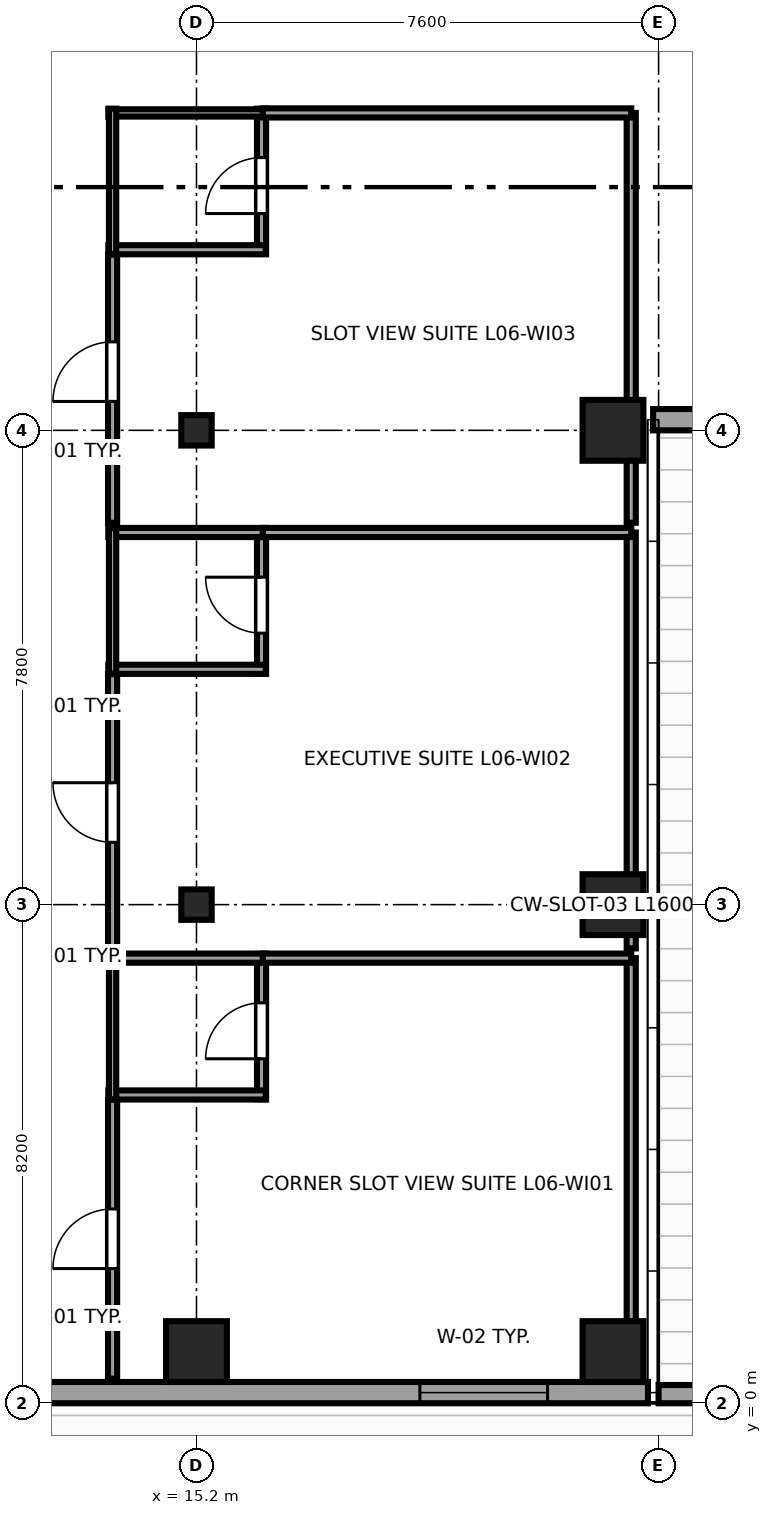
"""IFC4 building model, lengths in metres.
Left out: names, types, materials, properties, quantities, classifications, styles, units other than length and angle.
Written with IfcOpenShell. Run it as: python <this file> out.ifc"""

import sys

from ifc_helpers import new_model, si_unit, direction, frame, frame_2d, origin, origin_2d, place, context, subcontext, project, spatial, rectangle, i_section, extrude, source, transform, mapped, element, fill, save


model = new_model("IFC4")
c1 = context("Model", 3, precision=1e-05, world=origin(), true_north=direction((0.0, 1.0)))
c2 = subcontext(c1, "Body", "Model", "MODEL_VIEW")
j1 = project(units=[si_unit("LENGTHUNIT", "METRE"), si_unit("PLANEANGLEUNIT", "RADIAN")], contexts=[c1])
p1 = place(None, origin())
s1 = spatial("IfcSite", under=j1, at=p1, CompositionType="ELEMENT")
p2 = place(p1, origin())
s2 = spatial("IfcBuilding", under=s1, at=p2, CompositionType="ELEMENT")
p3 = place(p2, frame((0.0, 0.0, 32.0)))
s3 = spatial("IfcBuildingStorey", under=s2, at=p3, CompositionType="ELEMENT", Elevation=32.0)
m1 = source(origin(), c2, "Body", "SweptSolid", [
    extrude(rectangle(XDim=1.0, YDim=1.0, at=origin_2d()), origin(), (0.0, 0.0, 1.0), 3.55),
])
p4 = place(p3, frame((15.2, 0.85, 0.0), z_axis=(0.0, 0.0, 1.0), x_axis=(1.0, 0.0, 0.0)))
e1 = element("IfcColumn", 1, at=p4, inside=s3, PredefinedType="COLUMN", context=c2, shape_type="MappedRepresentation", body=[
    mapped(m1, transform((0.0, 0.0, 0.0), x_axis=(1.0, 0.0, 0.0), y_axis=(0.0, 1.0, 0.0), z_axis=(0.0, 0.0, 1.0), scale=1.0)),
])
m2 = source(origin(), c2, "Body", "SweptSolid", [
    extrude(i_section(OverallWidth=0.5, OverallDepth=0.5, WebThickness=0.028, FlangeThickness=0.045, at=origin_2d()), origin(), (0.0, 0.0, 1.0), 3.55),
])
for number, where, z_axis, x_axis in (
    (2, (15.2, 8.2, 0.0), (0.0, 0.0, 1.0), (1.0, 0.0, 0.0)),
    (3, (15.2, 16.0, 0.0), (0.0, 0.0, 1.0), (1.0, 0.0, 0.0)),
):
    element("IfcColumn", number, at=place(p3, frame(where, z_axis=z_axis, x_axis=x_axis)), inside=s3, PredefinedType="COLUMN", context=c2, shape_type="MappedRepresentation", body=[
        mapped(m2, transform((0.0, 0.0, 0.0), x_axis=(1.0, 0.0, 0.0), y_axis=(0.0, 1.0, 0.0), z_axis=(0.0, 0.0, 1.0), scale=1.0)),
    ])
for number, where, z_axis, x_axis in (
    (4, (22.05, 0.85, 0.0), (0.0, 0.0, 1.0), (1.0, 0.0, 0.0)),
    (5, (22.05, 8.2, 0.0), (0.0, 0.0, 1.0), (1.0, 0.0, 0.0)),
    (6, (22.05, 16.0, 0.0), (0.0, 0.0, 1.0), (1.0, 0.0, 0.0)),
):
    element("IfcColumn", number, at=place(p3, frame(where, z_axis=z_axis, x_axis=x_axis)), inside=s3, PredefinedType="COLUMN", context=c2, shape_type="MappedRepresentation", body=[
        mapped(m1, transform((0.0, 0.0, 0.0), x_axis=(1.0, 0.0, 0.0), y_axis=(0.0, 1.0, 0.0), z_axis=(0.0, 0.0, 1.0), scale=1.0)),
    ])
p5 = place(p3, frame((4.617, 0.175, 0.0), z_axis=(0.0, 0.0, 1.0), x_axis=(1.0, 0.0, 0.0)))
e7 = element("IfcWall", 7, at=p5, inside=s3, PredefinedType="SOLIDWALL", context=c2, shape_type="SweptSolid", body=[
    extrude(rectangle(XDim=18.008, YDim=0.35, at=frame_2d((9.004, 0.0))), origin(), (0.0, 0.0, 1.0), 3.37),
])
p6 = place(p5, frame((14.257, 0.0, 0.68)))
e8 = element("IfcOpeningElement", 8, at=p6, cuts=e7, PredefinedType="OPENING", context=c2, shape_type="SweptSolid", body=[
    extrude(rectangle(XDim=2.1, YDim=1.9, at=frame_2d((1.05, 0.95))), frame((0.0, 0.185, 0.0), z_axis=(0.0, -1.0, 0.0), x_axis=(1.0, 0.0, 0.0)), (0.0, 0.0, 1.0), 0.37),
])
p7 = place(p5, frame((3.7, 0.0, 0.62)))
e9 = element("IfcOpeningElement", 9, at=p7, cuts=e7, PredefinedType="OPENING", context=c2, shape_type="SweptSolid", body=[
    extrude(rectangle(XDim=1.5, YDim=1.55, at=frame_2d((0.75, 0.775))), frame((0.0, 0.185, 0.0), z_axis=(0.0, -1.0, 0.0), x_axis=(1.0, 0.0, 0.0)), (0.0, 0.0, 1.0), 0.37),
])
p8 = place(p3, frame((22.71, 16.175, 0.0), z_axis=(0.0, 0.0, 1.0), x_axis=(1.0, 0.0, 0.0)))
e10 = element("IfcWall", 10, at=p8, inside=s3, PredefinedType="SOLIDWALL", context=c2, shape_type="SweptSolid", body=[
    extrude(rectangle(XDim=11.58, YDim=0.35, at=frame_2d((5.79, 0.0))), origin(), (0.0, 0.0, 1.0), 2.748),
])
p9 = place(p8, frame((2.145, 0.0, 0.68)))
e11 = element("IfcOpeningElement", 11, at=p9, cuts=e10, PredefinedType="OPENING", context=c2, shape_type="SweptSolid", body=[
    extrude(rectangle(XDim=2.1, YDim=1.9, at=frame_2d((1.05, 0.95))), frame((0.0, 0.185, 0.0), z_axis=(0.0, -1.0, 0.0), x_axis=(1.0, 0.0, 0.0)), (0.0, 0.0, 1.0), 0.37),
])
p10 = place(p8, frame((7.335, 0.0, 0.68)))
e12 = element("IfcOpeningElement", 12, at=p10, cuts=e10, PredefinedType="OPENING", context=c2, shape_type="SweptSolid", body=[
    extrude(rectangle(XDim=2.1, YDim=1.9, at=frame_2d((1.05, 0.95))), frame((0.0, 0.185, 0.0), z_axis=(0.0, -1.0, 0.0), x_axis=(1.0, 0.0, 0.0)), (0.0, 0.0, 1.0), 0.37),
])
p11 = place(p3, frame((22.8, 0.15, 0.0), z_axis=(0.0, 0.0, 1.0), x_axis=(1.0, 0.0, 0.0)))
e13 = element("IfcWall", 13, at=p11, inside=s3, PredefinedType="PARAPET", context=c2, shape_type="SweptSolid", body=[
    extrude(rectangle(XDim=11.4, YDim=0.3, at=frame_2d((5.7, 0.0))), origin(), (0.0, 0.0, 1.0), 1.15),
])
p12 = place(p3, frame((16.27, 5.0, 0.0), z_axis=(0.0, 0.0, 1.0), x_axis=(0.0, 1.0, 0.0)))
e14 = element("IfcWall", 14, at=p12, inside=s3, PredefinedType="PARTITIONING", context=c2, shape_type="SweptSolid", body=[
    extrude(rectangle(XDim=2.39, YDim=0.15, at=frame_2d((1.195, 0.0))), origin(), (0.0, 0.0, 1.0), 3.37),
])
p13 = place(p12, frame((0.665, 0.0, 0.0)))
e15 = element("IfcOpeningElement", 15, at=p13, cuts=e14, PredefinedType="OPENING", context=c2, shape_type="SweptSolid", body=[
    extrude(rectangle(XDim=0.92, YDim=2.01, at=frame_2d((0.46, 1.005))), frame((0.0, 0.085, 0.0), z_axis=(0.0, -1.0, 0.0), x_axis=(1.0, 0.0, 0.0)), (0.0, 0.0, 1.0), 0.17),
])
for number, where, z_axis, x_axis in (
    (16, (13.75, 5.07, 0.0), (0.0, 0.0, 1.0), (1.0, 0.0, 0.0)),
    (17, (13.75, 7.32, 0.0), (0.0, 0.0, 1.0), (1.0, 0.0, 0.0)),
):
    element("IfcWall", number, at=place(p3, frame(where, z_axis=z_axis, x_axis=x_axis)), inside=s3, PredefinedType="PARTITIONING", context=c2, shape_type="SweptSolid", body=[
        extrude(rectangle(XDim=2.59, YDim=0.15, at=frame_2d((1.295, 0.0))), origin(), (0.0, 0.0, 1.0), 3.37),
    ])
p14 = place(p3, frame((13.82, 5.0, 0.0), z_axis=(0.0, 0.0, 1.0), x_axis=(0.0, 1.0, 0.0)))
e18 = element("IfcWall", 18, at=p14, inside=s3, PredefinedType="PLUMBINGWALL", context=c2, shape_type="SweptSolid", body=[
    extrude(rectangle(XDim=2.39, YDim=0.12, at=frame_2d((1.195, 0.0))), origin(), (0.0, 0.0, 1.0), 3.37),
])
p15 = place(p3, frame((16.27, 12.0, 0.0), z_axis=(0.0, 0.0, 1.0), x_axis=(0.0, 1.0, 0.0)))
e19 = element("IfcWall", 19, at=p15, inside=s3, PredefinedType="PARTITIONING", context=c2, shape_type="SweptSolid", body=[
    extrude(rectangle(XDim=2.39, YDim=0.15, at=frame_2d((1.195, 0.0))), origin(), (0.0, 0.0, 1.0), 3.37),
])
p16 = place(p15, frame((0.665, 0.0, 0.0)))
e20 = element("IfcOpeningElement", 20, at=p16, cuts=e19, PredefinedType="OPENING", context=c2, shape_type="SweptSolid", body=[
    extrude(rectangle(XDim=0.92, YDim=2.01, at=frame_2d((0.46, 1.005))), frame((0.0, 0.085, 0.0), z_axis=(0.0, -1.0, 0.0), x_axis=(1.0, 0.0, 0.0)), (0.0, 0.0, 1.0), 0.17),
])
for number, where, z_axis, x_axis in (
    (21, (13.75, 12.07, 0.0), (0.0, 0.0, 1.0), (1.0, 0.0, 0.0)),
    (22, (13.75, 14.32, 0.0), (0.0, 0.0, 1.0), (1.0, 0.0, 0.0)),
):
    element("IfcWall", number, at=place(p3, frame(where, z_axis=z_axis, x_axis=x_axis)), inside=s3, PredefinedType="PARTITIONING", context=c2, shape_type="SweptSolid", body=[
        extrude(rectangle(XDim=2.59, YDim=0.15, at=frame_2d((1.295, 0.0))), origin(), (0.0, 0.0, 1.0), 3.37),
    ])
p17 = place(p3, frame((13.82, 12.0, 0.0), z_axis=(0.0, 0.0, 1.0), x_axis=(0.0, 1.0, 0.0)))
e23 = element("IfcWall", 23, at=p17, inside=s3, PredefinedType="PLUMBINGWALL", context=c2, shape_type="SweptSolid", body=[
    extrude(rectangle(XDim=2.39, YDim=0.12, at=frame_2d((1.195, 0.0))), origin(), (0.0, 0.0, 1.0), 3.37),
])
p18 = place(p3, frame((16.27, 18.9, 0.0), z_axis=(0.0, 0.0, 1.0), x_axis=(0.0, 1.0, 0.0)))
e24 = element("IfcWall", 24, at=p18, inside=s3, PredefinedType="PARTITIONING", context=c2, shape_type="SweptSolid", body=[
    extrude(rectangle(XDim=2.39, YDim=0.15, at=frame_2d((1.195, 0.0))), origin(), (0.0, 0.0, 1.0), 3.37),
])
p19 = place(p18, frame((0.665, 0.0, 0.0)))
e25 = element("IfcOpeningElement", 25, at=p19, cuts=e24, PredefinedType="OPENING", context=c2, shape_type="SweptSolid", body=[
    extrude(rectangle(XDim=0.92, YDim=2.01, at=frame_2d((0.46, 1.005))), frame((0.0, 0.085, 0.0), z_axis=(0.0, -1.0, 0.0), x_axis=(1.0, 0.0, 0.0)), (0.0, 0.0, 1.0), 0.17),
])
p20 = place(p3, frame((13.75, 18.97, 0.0), z_axis=(0.0, 0.0, 1.0), x_axis=(1.0, 0.0, 0.0)))
e26 = element("IfcWall", 26, at=p20, inside=s3, PredefinedType="PARTITIONING", context=c2, shape_type="SweptSolid", body=[
    extrude(rectangle(XDim=2.59, YDim=0.15, at=frame_2d((1.295, 0.0))), origin(), (0.0, 0.0, 1.0), 3.37),
])
p21 = place(p3, frame((13.75, 21.22, 0.0), z_axis=(0.0, 0.0, 1.0), x_axis=(1.0, 0.0, 0.0)))
e27 = element("IfcWall", 27, at=p21, inside=s3, PredefinedType="PLUMBINGWALL", context=c2, shape_type="SweptSolid", body=[
    extrude(rectangle(XDim=2.59, YDim=0.12, at=frame_2d((1.295, 0.0))), origin(), (0.0, 0.0, 1.0), 3.37),
])
p22 = place(p3, frame((13.82, 18.9, 0.0), z_axis=(0.0, 0.0, 1.0), x_axis=(0.0, 1.0, 0.0)))
e28 = element("IfcWall", 28, at=p22, inside=s3, PredefinedType="PLUMBINGWALL", context=c2, shape_type="SweptSolid", body=[
    extrude(rectangle(XDim=2.39, YDim=0.12, at=frame_2d((1.195, 0.0))), origin(), (0.0, 0.0, 1.0), 3.37),
])
p23 = place(p3, frame((13.82, 0.405, 0.0), z_axis=(0.0, 0.0, 1.0), x_axis=(0.0, 1.0, 0.0)))
e29 = element("IfcWall", 29, at=p23, inside=s3, PredefinedType="PARTITIONING", context=c2, shape_type="SweptSolid", body=[
    extrude(rectangle(XDim=4.585, YDim=0.15, at=frame_2d((2.292, 0.0))), origin(), (0.0, 0.0, 1.0), 3.37),
])
p24 = place(p23, frame((1.81, 0.0, 0.0)))
e30 = element("IfcOpeningElement", 30, at=p24, cuts=e29, PredefinedType="OPENING", context=c2, shape_type="SweptSolid", body=[
    extrude(rectangle(XDim=0.98, YDim=2.12, at=frame_2d((0.49, 1.06))), frame((0.0, 0.085, 0.0), z_axis=(0.0, -1.0, 0.0), x_axis=(1.0, 0.0, 0.0)), (0.0, 0.0, 1.0), 0.17),
])
p25 = place(p3, frame((22.35, 0.405, 0.0), z_axis=(0.0, 0.0, 1.0), x_axis=(0.0, 1.0, 0.0)))
e31 = element("IfcWall", 31, at=p25, inside=s3, PredefinedType="PARTITIONING", context=c2, shape_type="SweptSolid", body=[
    extrude(rectangle(XDim=6.915, YDim=0.15, at=frame_2d((3.458, 0.0))), origin(), (0.0, 0.0, 1.0), 3.37),
])
p26 = place(p3, frame((16.29, 7.32, 0.0), z_axis=(0.0, 0.0, 1.0), x_axis=(1.0, 0.0, 0.0)))
e32 = element("IfcWall", 32, at=p26, inside=s3, PredefinedType="PARTITIONING", context=c2, shape_type="SweptSolid", body=[
    extrude(rectangle(XDim=6.06, YDim=0.15, at=frame_2d((3.03, 0.0))), origin(), (0.0, 0.0, 1.0), 3.37),
])
p27 = place(p3, frame((13.82, 7.48, 0.0), z_axis=(0.0, 0.0, 1.0), x_axis=(0.0, 1.0, 0.0)))
e33 = element("IfcWall", 33, at=p27, inside=s3, PredefinedType="PARTITIONING", context=c2, shape_type="SweptSolid", body=[
    extrude(rectangle(XDim=4.51, YDim=0.15, at=frame_2d((2.255, 0.0))), origin(), (0.0, 0.0, 1.0), 3.37),
])
p28 = place(p27, frame((1.745, 0.0, 0.0)))
e34 = element("IfcOpeningElement", 34, at=p28, cuts=e33, PredefinedType="OPENING", context=c2, shape_type="SweptSolid", body=[
    extrude(rectangle(XDim=0.98, YDim=2.12, at=frame_2d((0.49, 1.06))), frame((0.0, 0.085, 0.0), z_axis=(0.0, -1.0, 0.0), x_axis=(1.0, 0.0, 0.0)), (0.0, 0.0, 1.0), 0.17),
])
p29 = place(p3, frame((22.35, 7.48, 0.0), z_axis=(0.0, 0.0, 1.0), x_axis=(0.0, 1.0, 0.0)))
e35 = element("IfcWall", 35, at=p29, inside=s3, PredefinedType="PARTITIONING", context=c2, shape_type="SweptSolid", body=[
    extrude(rectangle(XDim=6.84, YDim=0.15, at=frame_2d((3.42, 0.0))), origin(), (0.0, 0.0, 1.0), 3.37),
])
p30 = place(p3, frame((16.29, 14.32, 0.0), z_axis=(0.0, 0.0, 1.0), x_axis=(1.0, 0.0, 0.0)))
e36 = element("IfcWall", 36, at=p30, inside=s3, PredefinedType="PARTITIONING", context=c2, shape_type="SweptSolid", body=[
    extrude(rectangle(XDim=6.06, YDim=0.15, at=frame_2d((3.03, 0.0))), origin(), (0.0, 0.0, 1.0), 3.37),
])
p31 = place(p3, frame((13.82, 14.48, 0.0), z_axis=(0.0, 0.0, 1.0), x_axis=(0.0, 1.0, 0.0)))
e37 = element("IfcWall", 37, at=p31, inside=s3, PredefinedType="PARTITIONING", context=c2, shape_type="SweptSolid", body=[
    extrude(rectangle(XDim=4.41, YDim=0.15, at=frame_2d((2.205, 0.0))), origin(), (0.0, 0.0, 1.0), 3.37),
])
p32 = place(p31, frame((1.995, 0.0, 0.0)))
e38 = element("IfcOpeningElement", 38, at=p32, cuts=e37, PredefinedType="OPENING", context=c2, shape_type="SweptSolid", body=[
    extrude(rectangle(XDim=0.98, YDim=2.12, at=frame_2d((0.49, 1.06))), frame((0.0, 0.085, 0.0), z_axis=(0.0, -1.0, 0.0), x_axis=(1.0, 0.0, 0.0)), (0.0, 0.0, 1.0), 0.17),
])
p33 = place(p3, frame((22.35, 14.48, 0.0), z_axis=(0.0, 0.0, 1.0), x_axis=(0.0, 1.0, 0.0)))
e39 = element("IfcWall", 39, at=p33, inside=s3, PredefinedType="PARTITIONING", context=c2, shape_type="SweptSolid", body=[
    extrude(rectangle(XDim=6.74, YDim=0.15, at=frame_2d((3.37, 0.0))), origin(), (0.0, 0.0, 1.0), 3.37),
])
p34 = place(p3, frame((16.29, 21.22, 0.0), z_axis=(0.0, 0.0, 1.0), x_axis=(1.0, 0.0, 0.0)))
e40 = element("IfcWall", 40, at=p34, inside=s3, PredefinedType="PARTITIONING", context=c2, shape_type="SweptSolid", body=[
    extrude(rectangle(XDim=6.06, YDim=0.15, at=frame_2d((3.03, 0.0))), origin(), (0.0, 0.0, 1.0), 3.37),
])
m3 = source(origin(), c2, "Body", "SweptSolid", [
    extrude(rectangle(XDim=2.1, YDim=1.9, at=frame_2d((1.05, 0.95))), frame((0.0, 0.09, 0.0), z_axis=(0.0, -1.0, 0.0), x_axis=(1.0, 0.0, 0.0)), (0.0, 0.0, 1.0), 0.06),
])
p35 = place(p6, origin())
e41 = element("IfcWindow", 41, at=p35, inside=s3, PartitioningType="TRIPLE_PANEL_HORIZONTAL", PredefinedType="WINDOW", context=c2, shape_type="MappedRepresentation", body=[
    mapped(m3, transform((0.0, 0.0, 0.0), x_axis=(1.0, 0.0, 0.0), y_axis=(0.0, 1.0, 0.0), z_axis=(0.0, 0.0, 1.0), scale=1.0)),
])
fill(e8, e41)
m4 = source(origin(), c2, "Body", "SweptSolid", [
    extrude(rectangle(XDim=0.92, YDim=2.01, at=frame_2d((0.46, 1.005))), frame((0.0, 0.025, 0.0), z_axis=(0.0, -1.0, 0.0), x_axis=(1.0, 0.0, 0.0)), (0.0, 0.0, 1.0), 0.05),
])
p36 = place(p13, origin())
e42 = element("IfcDoor", 42, at=p36, inside=s3, OperationType="SINGLE_SWING_LEFT", PredefinedType="DOOR", context=c2, shape_type="MappedRepresentation", body=[
    mapped(m4, transform((0.0, 0.0, 0.0), x_axis=(1.0, 0.0, 0.0), y_axis=(0.0, 1.0, 0.0), z_axis=(0.0, 0.0, 1.0), scale=1.0)),
])
fill(e15, e42)
p37 = place(p16, origin())
e43 = element("IfcDoor", 43, at=p37, inside=s3, OperationType="SINGLE_SWING_RIGHT", PredefinedType="DOOR", context=c2, shape_type="MappedRepresentation", body=[
    mapped(m4, transform((0.0, 0.0, 0.0), x_axis=(1.0, 0.0, 0.0), y_axis=(0.0, 1.0, 0.0), z_axis=(0.0, 0.0, 1.0), scale=1.0)),
])
fill(e20, e43)
p38 = place(p19, origin())
e44 = element("IfcDoor", 44, at=p38, inside=s3, OperationType="SINGLE_SWING_LEFT", PredefinedType="DOOR", context=c2, shape_type="MappedRepresentation", body=[
    mapped(m4, transform((0.0, 0.0, 0.0), x_axis=(1.0, 0.0, 0.0), y_axis=(0.0, 1.0, 0.0), z_axis=(0.0, 0.0, 1.0), scale=1.0)),
])
fill(e25, e44)
m5 = source(origin(), c2, "Body", "SweptSolid", [
    extrude(rectangle(XDim=0.98, YDim=2.12, at=frame_2d((0.49, 1.06))), frame((0.0, 0.025, 0.0), z_axis=(0.0, -1.0, 0.0), x_axis=(1.0, 0.0, 0.0)), (0.0, 0.0, 1.0), 0.05),
])
p39 = place(p24, origin())
e45 = element("IfcDoor", 45, at=p39, inside=s3, OperationType="SINGLE_SWING_LEFT", PredefinedType="DOOR", context=c2, shape_type="MappedRepresentation", body=[
    mapped(m5, transform((0.0, 0.0, 0.0), x_axis=(1.0, 0.0, 0.0), y_axis=(0.0, 1.0, 0.0), z_axis=(0.0, 0.0, 1.0), scale=1.0)),
])
fill(e30, e45)
p40 = place(p28, origin())
e46 = element("IfcDoor", 46, at=p40, inside=s3, OperationType="SINGLE_SWING_RIGHT", PredefinedType="DOOR", context=c2, shape_type="MappedRepresentation", body=[
    mapped(m5, transform((0.0, 0.0, 0.0), x_axis=(1.0, 0.0, 0.0), y_axis=(0.0, 1.0, 0.0), z_axis=(0.0, 0.0, 1.0), scale=1.0)),
])
fill(e34, e46)
p41 = place(p32, origin())
e47 = element("IfcDoor", 47, at=p41, inside=s3, OperationType="SINGLE_SWING_LEFT", PredefinedType="DOOR", context=c2, shape_type="MappedRepresentation", body=[
    mapped(m5, transform((0.0, 0.0, 0.0), x_axis=(1.0, 0.0, 0.0), y_axis=(0.0, 1.0, 0.0), z_axis=(0.0, 0.0, 1.0), scale=1.0)),
])
fill(e38, e47)
save(model, sys.argv[1])
